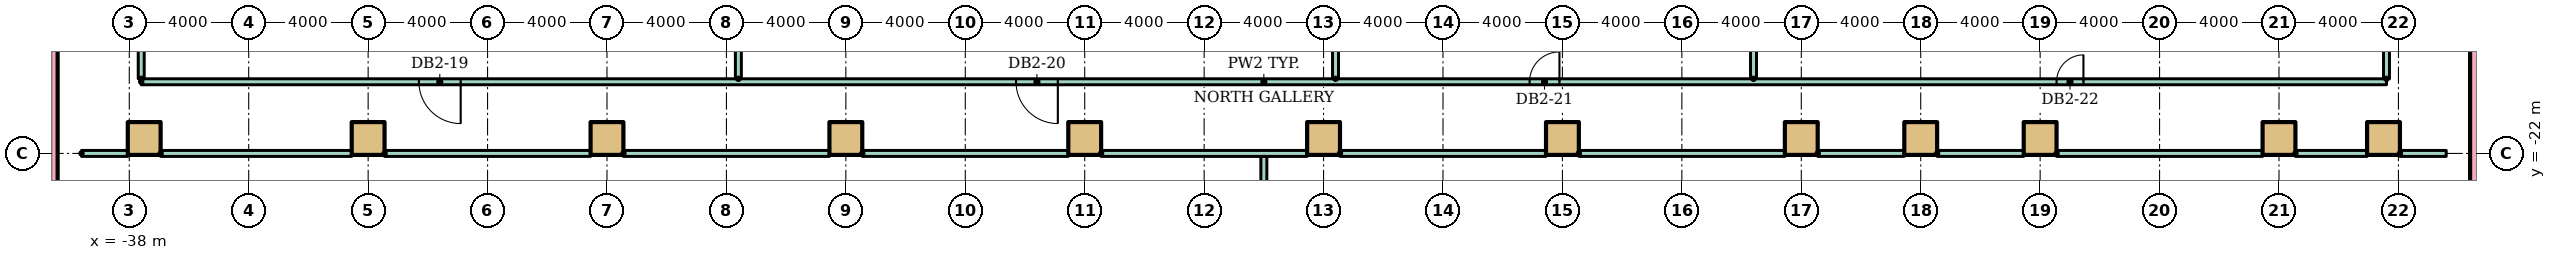
"""IFC4 building model, lengths in metres.
Left out: names, types, materials, properties, quantities, classifications, styles, units other than length and angle.
Written with IfcOpenShell. Run it as: python <this file> out.ifc"""

import sys

from ifc_helpers import new_model, si_unit, direction, frame, frame_2d, origin, origin_2d, place, context, subcontext, project, spatial, rectangle, extrude, element, fill, save


model = new_model("IFC4")
c1 = context("Model", 3, precision=1e-05, world=origin(), true_north=direction((0.0, 1.0)))
c2 = subcontext(c1, "Body", "Model", "MODEL_VIEW")
j1 = project(units=[si_unit("LENGTHUNIT", "METRE"), si_unit("PLANEANGLEUNIT", "RADIAN")], contexts=[c1])
p1 = place(None, origin())
s1 = spatial("IfcSite", under=j1, at=p1, CompositionType="ELEMENT")
p2 = place(p1, origin())
s2 = spatial("IfcBuilding", under=s1, at=p2, CompositionType="ELEMENT")
p3 = place(p2, frame((0.0, 0.0, -10.0)))
s3 = spatial("IfcBuildingStorey", under=s2, at=p3, CompositionType="ELEMENT", Elevation=-10.0)
for number, where, z_axis, x_axis in (
    (1, (-40.7, -50.4, -0.3), (0.0, 0.0, 1.0), (0.0, 1.0, 0.0)),
    (2, (40.7, -50.4, -0.3), (0.0, 0.0, 1.0), (0.0, 1.0, 0.0)),
):
    element("IfcWall", number, at=place(p3, frame(where, z_axis=z_axis, x_axis=x_axis)), inside=s3, PredefinedType="SOLIDWALL", context=c2, shape_type="SweptSolid", body=[
        extrude(rectangle(XDim=70.8, YDim=0.6, at=frame_2d((35.4, 0.0))), origin(), (0.0, 0.0, 1.0), 4.95),
    ])
for number, where in (
    (3, (-37.5, -21.5, -0.3)),
    (4, (-30.0, -21.5, -0.3)),
    (5, (-22.0, -21.5, -0.3)),
    (6, (-14.0, -21.5, -0.3)),
    (7, (-6.0, -21.5, -0.3)),
    (8, (2.0, -21.5, -0.3)),
    (9, (10.0, -21.5, -0.3)),
    (10, (18.0, -21.5, -0.3)),
    (11, (22.0, -21.5, -0.3)),
    (12, (26.0, -21.5, -0.3)),
    (13, (34.0, -21.5, -0.3)),
    (14, (37.5, -21.5, -0.3)),
):
    element("IfcColumn", number, at=place(p3, frame(where)), inside=s3, PredefinedType="COLUMN", context=c2, shape_type="SweptSolid", body=[
        extrude(rectangle(XDim=1.1, YDim=1.1, at=origin_2d()), origin(), (0.0, 0.0, 1.0), 5.3),
    ])
p4 = place(p3, frame((-39.6, -22.0, 0.0)))
e15 = element("IfcWall", 15, at=p4, inside=s3, PredefinedType="PARTITIONING", context=c2, shape_type="SweptSolid", body=[
    extrude(rectangle(XDim=1.55, YDim=0.2, at=frame_2d((0.775, 0.0))), origin(), (0.0, 0.0, 1.0), 4.65),
])
p5 = place(p3, frame((-36.95, -22.0, 0.0)))
e16 = element("IfcWall", 16, at=p5, inside=s3, PredefinedType="PARTITIONING", context=c2, shape_type="SweptSolid", body=[
    extrude(rectangle(XDim=6.4, YDim=0.2, at=frame_2d((3.2, 0.0))), origin(), (0.0, 0.0, 1.0), 4.65),
])
for number, where in (
    (17, (-29.45, -22.0, 0.0)),
    (18, (-21.45, -22.0, 0.0)),
    (19, (-13.45, -22.0, 0.0)),
    (20, (-5.45, -22.0, 0.0)),
    (21, (2.55, -22.0, 0.0)),
    (22, (10.55, -22.0, 0.0)),
):
    element("IfcWall", number, at=place(p3, frame(where)), inside=s3, PredefinedType="PARTITIONING", context=c2, shape_type="SweptSolid", body=[
        extrude(rectangle(XDim=6.9, YDim=0.2, at=frame_2d((3.45, 0.0))), origin(), (0.0, 0.0, 1.0), 4.65),
    ])
for number, where in (
    (23, (18.55, -22.0, 0.0)),
    (24, (22.55, -22.0, 0.0)),
):
    element("IfcWall", number, at=place(p3, frame(where)), inside=s3, PredefinedType="PARTITIONING", context=c2, shape_type="SweptSolid", body=[
        extrude(rectangle(XDim=2.9, YDim=0.2, at=frame_2d((1.45, 0.0))), origin(), (0.0, 0.0, 1.0), 4.65),
    ])
p6 = place(p3, frame((26.55, -22.0, 0.0)))
e25 = element("IfcWall", 25, at=p6, inside=s3, PredefinedType="PARTITIONING", context=c2, shape_type="SweptSolid", body=[
    extrude(rectangle(XDim=6.9, YDim=0.2, at=frame_2d((3.45, 0.0))), origin(), (0.0, 0.0, 1.0), 4.65),
])
p7 = place(p3, frame((34.55, -22.0, 0.0)))
e26 = element("IfcWall", 26, at=p7, inside=s3, PredefinedType="PARTITIONING", context=c2, shape_type="SweptSolid", body=[
    extrude(rectangle(XDim=2.4, YDim=0.2, at=frame_2d((1.2, 0.0))), origin(), (0.0, 0.0, 1.0), 4.65),
])
p8 = place(p3, frame((38.05, -22.0, 0.0)))
e27 = element("IfcWall", 27, at=p8, inside=s3, PredefinedType="PARTITIONING", context=c2, shape_type="SweptSolid", body=[
    extrude(rectangle(XDim=1.55, YDim=0.2, at=frame_2d((0.775, 0.0))), origin(), (0.0, 0.0, 1.0), 4.65),
])
p9 = place(p3, frame((-37.6, -19.6, 0.0)))
e28 = element("IfcWall", 28, at=p9, inside=s3, PredefinedType="PARTITIONING", context=c2, shape_type="SweptSolid", body=[
    extrude(rectangle(XDim=75.2, YDim=0.2, at=frame_2d((37.6, 0.0))), origin(), (0.0, 0.0, 1.0), 4.65),
])
p10 = place(p9, frame((9.3, 0.0, 0.0)))
e29 = element("IfcOpeningElement", 29, at=p10, cuts=e28, PredefinedType="OPENING", context=c2, shape_type="SweptSolid", body=[
    extrude(rectangle(XDim=1.4, YDim=2.1, at=frame_2d((0.7, 1.05))), frame((0.0, 0.11, 0.0), z_axis=(0.0, -1.0, 0.0), x_axis=(1.0, 0.0, 0.0)), (0.0, 0.0, 1.0), 0.22),
])
p11 = place(p9, frame((29.3, 0.0, 0.0)))
e30 = element("IfcOpeningElement", 30, at=p11, cuts=e28, PredefinedType="OPENING", context=c2, shape_type="SweptSolid", body=[
    extrude(rectangle(XDim=1.4, YDim=2.1, at=frame_2d((0.7, 1.05))), frame((0.0, 0.11, 0.0), z_axis=(0.0, -1.0, 0.0), x_axis=(1.0, 0.0, 0.0)), (0.0, 0.0, 1.0), 0.22),
])
p12 = place(p9, frame((46.5, 0.0, 0.0)))
e31 = element("IfcOpeningElement", 31, at=p12, cuts=e28, PredefinedType="OPENING", context=c2, shape_type="SweptSolid", body=[
    extrude(rectangle(XDim=1.0, YDim=2.1, at=frame_2d((0.5, 1.05))), frame((0.0, 0.11, 0.0), z_axis=(0.0, -1.0, 0.0), x_axis=(1.0, 0.0, 0.0)), (0.0, 0.0, 1.0), 0.22),
])
p13 = place(p9, frame((64.15, 0.0, 0.0)))
e32 = element("IfcOpeningElement", 32, at=p13, cuts=e28, PredefinedType="OPENING", context=c2, shape_type="SweptSolid", body=[
    extrude(rectangle(XDim=0.9, YDim=2.1, at=frame_2d((0.45, 1.05))), frame((0.0, 0.11, 0.0), z_axis=(0.0, -1.0, 0.0), x_axis=(1.0, 0.0, 0.0)), (0.0, 0.0, 1.0), 0.22),
])
p14 = place(p3, frame((-37.6, -19.5, 0.0), z_axis=(0.0, 0.0, 1.0), x_axis=(0.0, 1.0, 0.0)))
e33 = element("IfcWall", 33, at=p14, inside=s3, PredefinedType="PARTITIONING", context=c2, shape_type="SweptSolid", body=[
    extrude(rectangle(XDim=6.2, YDim=0.2, at=frame_2d((3.1, 0.0))), origin(), (0.0, 0.0, 1.0), 4.65),
])
p15 = place(p3, frame((-17.6, -19.5, 0.0), z_axis=(0.0, 0.0, 1.0), x_axis=(0.0, 1.0, 0.0)))
e34 = element("IfcWall", 34, at=p15, inside=s3, PredefinedType="PARTITIONING", context=c2, shape_type="SweptSolid", body=[
    extrude(rectangle(XDim=10.65, YDim=0.2, at=frame_2d((5.325, 0.0))), origin(), (0.0, 0.0, 1.0), 4.65),
])
p16 = place(p3, frame((0.0, -43.9, 0.0), z_axis=(0.0, 0.0, 1.0), x_axis=(0.0, 1.0, 0.0)))
e35 = element("IfcWall", 35, at=p16, inside=s3, PredefinedType="PARTITIONING", context=c2, shape_type="SweptSolid", body=[
    extrude(rectangle(XDim=21.8, YDim=0.2, at=frame_2d((10.9, 0.0))), origin(), (0.0, 0.0, 1.0), 4.65),
])
p17 = place(p3, frame((2.4, -19.5, 0.0), z_axis=(0.0, 0.0, 1.0), x_axis=(0.0, 1.0, 0.0)))
e36 = element("IfcWall", 36, at=p17, inside=s3, PredefinedType="PARTITIONING", context=c2, shape_type="SweptSolid", body=[
    extrude(rectangle(XDim=1.7, YDim=0.2, at=frame_2d((0.85, 0.0))), origin(), (0.0, 0.0, 1.0), 4.65),
])
p18 = place(p3, frame((16.4, -19.5, 0.0), z_axis=(0.0, 0.0, 1.0), x_axis=(0.0, 1.0, 0.0)))
e37 = element("IfcWall", 37, at=p18, inside=s3, PredefinedType="PARTITIONING", context=c2, shape_type="SweptSolid", body=[
    extrude(rectangle(XDim=10.65, YDim=0.2, at=frame_2d((5.325, 0.0))), origin(), (0.0, 0.0, 1.0), 4.65),
])
p19 = place(p3, frame((37.6, -19.5, 0.0), z_axis=(0.0, 0.0, 1.0), x_axis=(0.0, 1.0, 0.0)))
e38 = element("IfcWall", 38, at=p19, inside=s3, PredefinedType="PARTITIONING", context=c2, shape_type="SweptSolid", body=[
    extrude(rectangle(XDim=6.2, YDim=0.2, at=frame_2d((3.1, 0.0))), origin(), (0.0, 0.0, 1.0), 4.65),
])
p20 = place(p10, frame((1.4, 0.0, 0.0), z_axis=(0.0, 0.0, 1.0), x_axis=(-1.0, 0.0, 0.0)))
e39 = element("IfcDoor", 39, at=p20, inside=s3, OperationType="DOUBLE_DOOR_SINGLE_SWING", PredefinedType="DOOR", context=c2, shape_type="SweptSolid", body=[
    extrude(rectangle(XDim=1.4, YDim=2.1, at=frame_2d((0.7, 1.05))), frame((0.0, 0.025, 0.0), z_axis=(0.0, -1.0, 0.0), x_axis=(1.0, 0.0, 0.0)), (0.0, 0.0, 1.0), 0.05),
])
fill(e29, e39)
p21 = place(p11, frame((1.4, 0.0, 0.0), z_axis=(0.0, 0.0, 1.0), x_axis=(-1.0, 0.0, 0.0)))
e40 = element("IfcDoor", 40, at=p21, inside=s3, OperationType="DOUBLE_DOOR_SINGLE_SWING", PredefinedType="DOOR", context=c2, shape_type="SweptSolid", body=[
    extrude(rectangle(XDim=1.4, YDim=2.1, at=frame_2d((0.7, 1.05))), frame((0.0, 0.025, 0.0), z_axis=(0.0, -1.0, 0.0), x_axis=(1.0, 0.0, 0.0)), (0.0, 0.0, 1.0), 0.05),
])
fill(e30, e40)
p22 = place(p12, origin())
e41 = element("IfcDoor", 41, at=p22, inside=s3, OperationType="SINGLE_SWING_RIGHT", PredefinedType="DOOR", context=c2, shape_type="SweptSolid", body=[
    extrude(rectangle(XDim=1.0, YDim=2.1, at=frame_2d((0.5, 1.05))), frame((0.0, 0.025, 0.0), z_axis=(0.0, -1.0, 0.0), x_axis=(1.0, 0.0, 0.0)), (0.0, 0.0, 1.0), 0.05),
])
fill(e31, e41)
p23 = place(p13, origin())
e42 = element("IfcDoor", 42, at=p23, inside=s3, OperationType="SINGLE_SWING_RIGHT", PredefinedType="DOOR", context=c2, shape_type="SweptSolid", body=[
    extrude(rectangle(XDim=0.9, YDim=2.1, at=frame_2d((0.45, 1.05))), frame((0.0, 0.025, 0.0), z_axis=(0.0, -1.0, 0.0), x_axis=(1.0, 0.0, 0.0)), (0.0, 0.0, 1.0), 0.05),
])
fill(e32, e42)
save(model, sys.argv[1])
